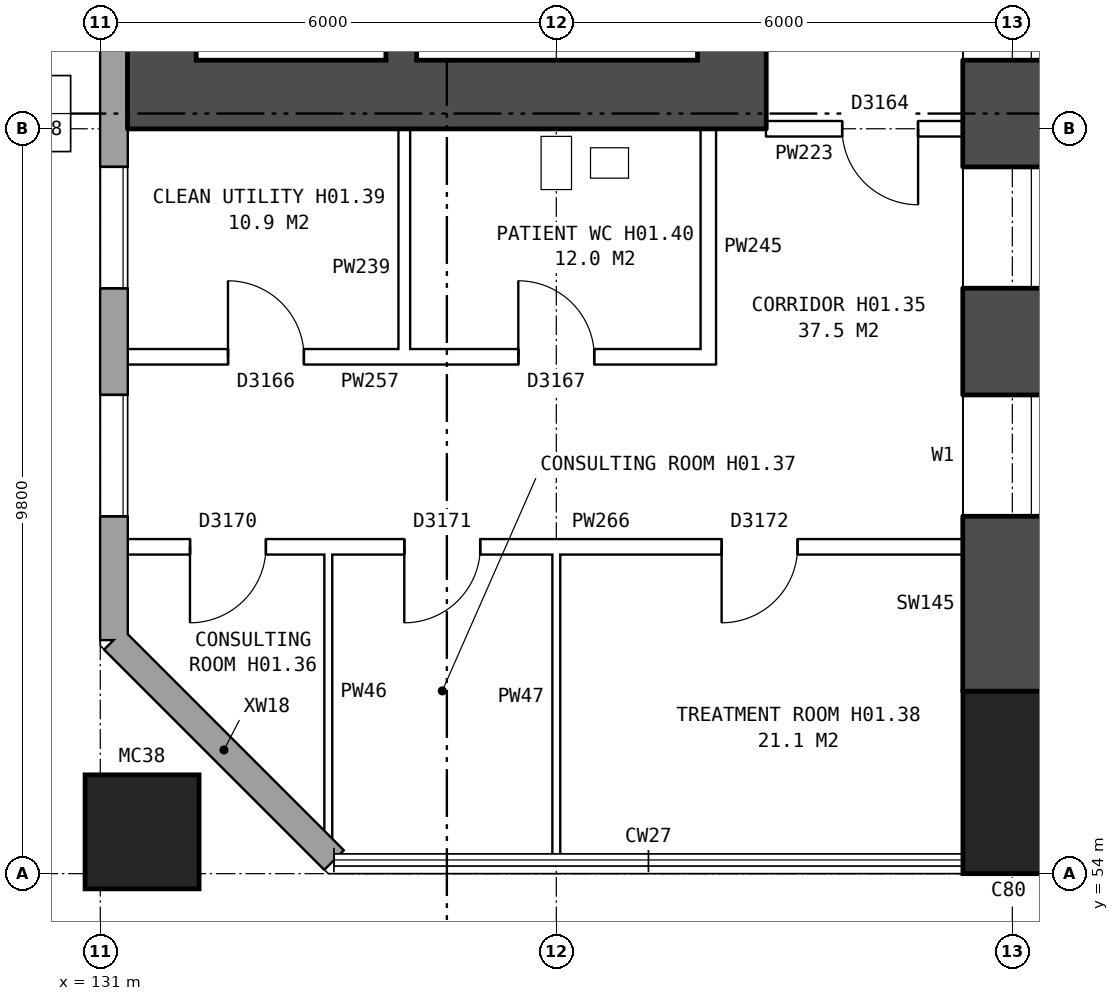
"""IFC4 building model, lengths in metres.
Left out: names, types, materials, properties, quantities, classifications, styles, units other than length and angle.
Written with IfcOpenShell. Run it as: python <this file> out.ifc"""

import sys

from ifc_helpers import new_model, si_unit, direction, frame, frame_2d, origin, origin_2d, place, context, subcontext, project, spatial, rectangle, hollow_rectangle, extrude, element, fill, save


model = new_model("IFC4")
c1 = context("Model", 3, precision=1e-05, world=origin(), true_north=direction((0.0, 1.0)))
c2 = subcontext(c1, "Body", "Model", "MODEL_VIEW")
j1 = project(units=[si_unit("LENGTHUNIT", "METRE"), si_unit("PLANEANGLEUNIT", "RADIAN")], contexts=[c1])
p1 = place(None, origin())
s1 = spatial("IfcSite", under=j1, at=p1, CompositionType="ELEMENT")
p2 = place(p1, origin())
s2 = spatial("IfcBuilding", under=s1, at=p2, CompositionType="ELEMENT")
p3 = place(p2, frame((0.0, 0.0, 5.5)))
s3 = spatial("IfcBuildingStorey", under=s2, at=p3, CompositionType="ELEMENT", Elevation=5.5)
p4 = place(p3, frame((142.95, 55.2, -0.3), z_axis=(0.0, 0.0, 1.0), x_axis=(1.0, 0.0, 0.0)))
e1 = element("IfcColumn", 1, at=p4, inside=s3, PredefinedType="COLUMN", context=c2, shape_type="SweptSolid", body=[
    extrude(rectangle(XDim=1.2, YDim=2.4, at=origin_2d()), origin(), (0.0, 0.0, 1.0), 4.6),
])
p5 = place(p3, frame((142.95, 56.4, -0.3), z_axis=(0.0, 0.0, 1.0), x_axis=(0.0, 1.0, 0.0)))
e2 = element("IfcWall", 2, at=p5, inside=s3, PredefinedType="SHEAR", context=c2, shape_type="SweptSolid", body=[
    extrude(rectangle(XDim=27.2, YDim=1.2, at=frame_2d((13.6, 0.0))), origin(), (0.0, 0.0, 1.0), 4.6),
])
p6 = place(p5, frame((2.3, 0.0, 0.8)))
e3 = element("IfcOpeningElement", 3, at=p6, cuts=e2, PredefinedType="OPENING", context=c2, shape_type="SweptSolid", body=[
    extrude(rectangle(XDim=1.6, YDim=1.8, at=frame_2d((0.8, 0.9))), frame((0.0, 0.61, 0.0), z_axis=(0.0, -1.0, 0.0), x_axis=(1.0, 0.0, 0.0)), (0.0, 0.0, 1.0), 1.22),
])
p7 = place(p5, frame((5.3, 0.0, 0.8)))
e4 = element("IfcOpeningElement", 4, at=p7, cuts=e2, PredefinedType="OPENING", context=c2, shape_type="SweptSolid", body=[
    extrude(rectangle(XDim=1.6, YDim=1.8, at=frame_2d((0.8, 0.9))), frame((0.0, 0.61, 0.0), z_axis=(0.0, -1.0, 0.0), x_axis=(1.0, 0.0, 0.0)), (0.0, 0.0, 1.0), 1.22),
])
p8 = place(p5, frame((8.3, 0.0, 0.8)))
e5 = element("IfcOpeningElement", 5, at=p8, cuts=e2, PredefinedType="OPENING", context=c2, shape_type="SweptSolid", body=[
    extrude(rectangle(XDim=1.6, YDim=1.8, at=frame_2d((0.8, 0.9))), frame((0.0, 0.61, 0.0), z_axis=(0.0, -1.0, 0.0), x_axis=(1.0, 0.0, 0.0)), (0.0, 0.0, 1.0), 1.22),
])
p9 = place(p5, frame((11.3, 0.0, 0.8)))
e6 = element("IfcOpeningElement", 6, at=p9, cuts=e2, PredefinedType="OPENING", context=c2, shape_type="SweptSolid", body=[
    extrude(rectangle(XDim=1.6, YDim=1.8, at=frame_2d((0.8, 0.9))), frame((0.0, 0.61, 0.0), z_axis=(0.0, -1.0, 0.0), x_axis=(1.0, 0.0, 0.0)), (0.0, 0.0, 1.0), 1.22),
])
p10 = place(p5, frame((14.3, 0.0, 0.8)))
e7 = element("IfcOpeningElement", 7, at=p10, cuts=e2, PredefinedType="OPENING", context=c2, shape_type="SweptSolid", body=[
    extrude(rectangle(XDim=1.6, YDim=1.8, at=frame_2d((0.8, 0.9))), frame((0.0, 0.61, 0.0), z_axis=(0.0, -1.0, 0.0), x_axis=(1.0, 0.0, 0.0)), (0.0, 0.0, 1.0), 1.22),
])
p11 = place(p5, frame((17.3, 0.0, 0.8)))
e8 = element("IfcOpeningElement", 8, at=p11, cuts=e2, PredefinedType="OPENING", context=c2, shape_type="SweptSolid", body=[
    extrude(rectangle(XDim=1.6, YDim=1.8, at=frame_2d((0.8, 0.9))), frame((0.0, 0.61, 0.0), z_axis=(0.0, -1.0, 0.0), x_axis=(1.0, 0.0, 0.0)), (0.0, 0.0, 1.0), 1.22),
])
p12 = place(p5, frame((20.3, 0.0, 0.8)))
e9 = element("IfcOpeningElement", 9, at=p12, cuts=e2, PredefinedType="OPENING", context=c2, shape_type="SweptSolid", body=[
    extrude(rectangle(XDim=1.6, YDim=1.8, at=frame_2d((0.8, 0.9))), frame((0.0, 0.61, 0.0), z_axis=(0.0, -1.0, 0.0), x_axis=(1.0, 0.0, 0.0)), (0.0, 0.0, 1.0), 1.22),
])
p13 = place(p5, frame((23.3, 0.0, 0.8)))
e10 = element("IfcOpeningElement", 10, at=p13, cuts=e2, PredefinedType="OPENING", context=c2, shape_type="SweptSolid", body=[
    extrude(rectangle(XDim=1.6, YDim=1.8, at=frame_2d((0.8, 0.9))), frame((0.0, 0.61, 0.0), z_axis=(0.0, -1.0, 0.0), x_axis=(1.0, 0.0, 0.0)), (0.0, 0.0, 1.0), 1.22),
])
p14 = place(p3, frame((131.55, 54.55, 0.0), z_axis=(0.0, 0.0, 1.0), x_axis=(1.0, 0.0, 0.0)))
e11 = element("IfcColumn", 11, at=p14, inside=s3, PredefinedType="COLUMN", context=c2, shape_type="SweptSolid", body=[
    extrude(hollow_rectangle(XDim=1.5, YDim=1.5, WallThickness=0.08, at=origin_2d()), origin(), (0.0, 0.0, 1.0), 4.6),
])
p15 = place(p3, frame((131.18, 57.075, 0.0), z_axis=(0.0, 0.0, 1.0), x_axis=(0.707106781187, -0.707106781187, 0.0)))
e12 = element("IfcWall", 12, at=p15, inside=s3, PredefinedType="STANDARD", context=c2, shape_type="SweptSolid", body=[
    extrude(rectangle(XDim=4.094, YDim=0.36, at=frame_2d((2.047, 0.0))), origin(), (0.0, 0.0, 1.0), 4.3),
])
p16 = place(p3, frame((131.18, 82.925, 0.0), z_axis=(0.0, 0.0, 1.0), x_axis=(0.0, -1.0, 0.0)))
e13 = element("IfcWall", 13, at=p16, inside=s3, PredefinedType="STANDARD", context=c2, shape_type="SweptSolid", body=[
    extrude(rectangle(XDim=25.851, YDim=0.36, at=frame_2d((12.925, 0.0))), origin(), (0.0, 0.0, 1.0), 4.3),
])
p17 = place(p16, frame((1.625, 0.0, 0.8)))
e14 = element("IfcOpeningElement", 14, at=p17, cuts=e13, PredefinedType="OPENING", context=c2, shape_type="SweptSolid", body=[
    extrude(rectangle(XDim=1.6, YDim=1.8, at=frame_2d((0.8, 0.9))), frame((0.0, 0.19, 0.0), z_axis=(0.0, -1.0, 0.0), x_axis=(1.0, 0.0, 0.0)), (0.0, 0.0, 1.0), 0.38),
])
p18 = place(p16, frame((4.625, 0.0, 0.8)))
e15 = element("IfcOpeningElement", 15, at=p18, cuts=e13, PredefinedType="OPENING", context=c2, shape_type="SweptSolid", body=[
    extrude(rectangle(XDim=1.6, YDim=1.8, at=frame_2d((0.8, 0.9))), frame((0.0, 0.19, 0.0), z_axis=(0.0, -1.0, 0.0), x_axis=(1.0, 0.0, 0.0)), (0.0, 0.0, 1.0), 0.38),
])
p19 = place(p16, frame((19.625, 0.0, 0.8)))
e16 = element("IfcOpeningElement", 16, at=p19, cuts=e13, PredefinedType="OPENING", context=c2, shape_type="SweptSolid", body=[
    extrude(rectangle(XDim=1.6, YDim=1.8, at=frame_2d((0.8, 0.9))), frame((0.0, 0.19, 0.0), z_axis=(0.0, -1.0, 0.0), x_axis=(1.0, 0.0, 0.0)), (0.0, 0.0, 1.0), 0.38),
])
p20 = place(p16, frame((22.625, 0.0, 0.8)))
e17 = element("IfcOpeningElement", 17, at=p20, cuts=e13, PredefinedType="OPENING", context=c2, shape_type="SweptSolid", body=[
    extrude(rectangle(XDim=1.6, YDim=1.8, at=frame_2d((0.8, 0.9))), frame((0.0, 0.19, 0.0), z_axis=(0.0, -1.0, 0.0), x_axis=(1.0, 0.0, 0.0)), (0.0, 0.0, 1.0), 0.38),
])
p21 = place(p3, frame((139.31, 64.7, 0.0), z_axis=(0.0, 0.0, 1.0), x_axis=(0.0, 1.0, 0.0)))
e18 = element("IfcWall", 18, at=p21, inside=s3, PredefinedType="SHEAR", context=c2, shape_type="SweptSolid", body=[
    extrude(rectangle(XDim=10.6, YDim=0.9, at=frame_2d((5.3, 0.0))), origin(), (0.0, 0.0, 1.0), 4.3),
])
p22 = place(p21, frame((0.425, 0.0, 0.0)))
e19 = element("IfcOpeningElement", 19, at=p22, cuts=e18, PredefinedType="OPENING", context=c2, shape_type="SweptSolid", body=[
    extrude(rectangle(XDim=1.1, YDim=2.1, at=frame_2d((0.55, 1.05))), frame((0.0, 0.46, 0.0), z_axis=(0.0, -1.0, 0.0), x_axis=(1.0, 0.0, 0.0)), (0.0, 0.0, 1.0), 0.92),
])
p23 = place(p21, frame((9.0, 0.0, 0.0)))
e20 = element("IfcOpeningElement", 20, at=p23, cuts=e18, PredefinedType="OPENING", context=c2, shape_type="SweptSolid", body=[
    extrude(rectangle(XDim=1.1, YDim=2.1, at=frame_2d((0.55, 1.05))), frame((0.0, 0.46, 0.0), z_axis=(0.0, -1.0, 0.0), x_axis=(1.0, 0.0, 0.0)), (0.0, 0.0, 1.0), 0.92),
])
p24 = place(p21, frame((7.225, 0.0, 0.0)))
e21 = element("IfcOpeningElement", 21, at=p24, cuts=e18, PredefinedType="OPENING", context=c2, shape_type="SweptSolid", body=[
    extrude(rectangle(XDim=0.85, YDim=2.1, at=frame_2d((0.425, 1.05))), frame((0.0, 0.46, 0.0), z_axis=(0.0, -1.0, 0.0), x_axis=(1.0, 0.0, 0.0)), (0.0, 0.0, 1.0), 0.92),
])
p25 = place(p3, frame((131.81, 64.7, 0.0), z_axis=(0.0, 0.0, 1.0), x_axis=(0.0, 1.0, 0.0)))
e22 = element("IfcWall", 22, at=p25, inside=s3, PredefinedType="SHEAR", context=c2, shape_type="SweptSolid", body=[
    extrude(rectangle(XDim=10.6, YDim=0.9, at=frame_2d((5.3, 0.0))), origin(), (0.0, 0.0, 1.0), 4.3),
])
p26 = place(p3, frame((139.76, 64.25, 0.0), z_axis=(0.0, 0.0, 1.0), x_axis=(-1.0, 0.0, 0.0)))
e23 = element("IfcWall", 23, at=p26, inside=s3, PredefinedType="SHEAR", context=c2, shape_type="SweptSolid", body=[
    extrude(rectangle(XDim=8.4, YDim=0.9, at=frame_2d((4.2, 0.0))), origin(), (0.0, 0.0, 1.0), 4.3),
])
p27 = place(p3, frame((134.96, 64.7, 0.0), z_axis=(0.0, 0.0, 1.0), x_axis=(0.0, 1.0, 0.0)))
e24 = element("IfcWall", 24, at=p27, inside=s3, PredefinedType="SHEAR", context=c2, shape_type="SweptSolid", body=[
    extrude(rectangle(XDim=6.35, YDim=0.4, at=frame_2d((3.175, 0.0))), origin(), (0.0, 0.0, 1.0), 4.3),
])
p28 = place(p3, frame((131.24, 58.3, 0.0), z_axis=(0.0, 0.0, 1.0), x_axis=(1.0, 0.0, 0.0)))
e25 = element("IfcWall", 25, at=p28, inside=s3, PredefinedType="PARTITIONING", context=c2, shape_type="SweptSolid", body=[
    extrude(rectangle(XDim=11.23, YDim=0.2, at=frame_2d((5.615, 0.0))), origin(), (0.0, 0.0, 1.0), 4.3),
])
p29 = place(p28, frame((0.94, 0.0, 0.0)))
e26 = element("IfcOpeningElement", 26, at=p29, cuts=e25, PredefinedType="OPENING", context=c2, shape_type="SweptSolid", body=[
    extrude(rectangle(XDim=1.0, YDim=2.1, at=frame_2d((0.5, 1.05))), frame((0.0, 0.11, 0.0), z_axis=(0.0, -1.0, 0.0), x_axis=(1.0, 0.0, 0.0)), (0.0, 0.0, 1.0), 0.22),
])
p30 = place(p28, frame((3.76, 0.0, 0.0)))
e27 = element("IfcOpeningElement", 27, at=p30, cuts=e25, PredefinedType="OPENING", context=c2, shape_type="SweptSolid", body=[
    extrude(rectangle(XDim=1.0, YDim=2.1, at=frame_2d((0.5, 1.05))), frame((0.0, 0.11, 0.0), z_axis=(0.0, -1.0, 0.0), x_axis=(1.0, 0.0, 0.0)), (0.0, 0.0, 1.0), 0.22),
])
p31 = place(p28, frame((7.935, 0.0, 0.0)))
e28 = element("IfcOpeningElement", 28, at=p31, cuts=e25, PredefinedType="OPENING", context=c2, shape_type="SweptSolid", body=[
    extrude(rectangle(XDim=1.0, YDim=2.1, at=frame_2d((0.5, 1.05))), frame((0.0, 0.11, 0.0), z_axis=(0.0, -1.0, 0.0), x_axis=(1.0, 0.0, 0.0)), (0.0, 0.0, 1.0), 0.22),
])
p32 = place(p3, frame((131.24, 60.8, 0.0), z_axis=(0.0, 0.0, 1.0), x_axis=(1.0, 0.0, 0.0)))
e29 = element("IfcWall", 29, at=p32, inside=s3, PredefinedType="PARTITIONING", context=c2, shape_type="SweptSolid", body=[
    extrude(rectangle(XDim=7.86, YDim=0.2, at=frame_2d((3.93, 0.0))), origin(), (0.0, 0.0, 1.0), 4.3),
])
p33 = place(p32, frame((1.44, 0.0, 0.0)))
e30 = element("IfcOpeningElement", 30, at=p33, cuts=e29, PredefinedType="OPENING", context=c2, shape_type="SweptSolid", body=[
    extrude(rectangle(XDim=1.0, YDim=2.1, at=frame_2d((0.5, 1.05))), frame((0.0, 0.11, 0.0), z_axis=(0.0, -1.0, 0.0), x_axis=(1.0, 0.0, 0.0)), (0.0, 0.0, 1.0), 0.22),
])
p34 = place(p32, frame((5.26, 0.0, 0.0)))
e31 = element("IfcOpeningElement", 31, at=p34, cuts=e29, PredefinedType="OPENING", context=c2, shape_type="SweptSolid", body=[
    extrude(rectangle(XDim=1.0, YDim=2.1, at=frame_2d((0.5, 1.05))), frame((0.0, 0.11, 0.0), z_axis=(0.0, -1.0, 0.0), x_axis=(1.0, 0.0, 0.0)), (0.0, 0.0, 1.0), 0.22),
])
p35 = place(p3, frame((139.76, 63.8, 0.0), z_axis=(0.0, 0.0, 1.0), x_axis=(1.0, 0.0, 0.0)))
e32 = element("IfcWall", 32, at=p35, inside=s3, PredefinedType="PARTITIONING", context=c2, shape_type="SweptSolid", body=[
    extrude(rectangle(XDim=2.59, YDim=0.2, at=frame_2d((1.295, 0.0))), origin(), (0.0, 0.0, 1.0), 4.3),
])
p36 = place(p35, frame((1.0, 0.0, 0.0)))
e33 = element("IfcOpeningElement", 33, at=p36, cuts=e32, PredefinedType="OPENING", context=c2, shape_type="SweptSolid", body=[
    extrude(rectangle(XDim=1.0, YDim=2.1, at=frame_2d((0.5, 1.05))), frame((0.0, 0.11, 0.0), z_axis=(0.0, -1.0, 0.0), x_axis=(1.0, 0.0, 0.0)), (0.0, 0.0, 1.0), 0.22),
])
p37 = place(p3, frame((134.0, 54.389, 0.0), z_axis=(0.0, 0.0, 1.0), x_axis=(0.0, 1.0, 0.0)))
e34 = element("IfcWall", 34, at=p37, inside=s3, PredefinedType="PARTITIONING", context=c2, shape_type="SweptSolid", body=[
    extrude(rectangle(XDim=4.011, YDim=0.1, at=frame_2d((2.005, 0.0))), origin(), (0.0, 0.0, 1.0), 4.3),
])
p38 = place(p3, frame((135.0, 60.7, 0.0), z_axis=(0.0, 0.0, 1.0), x_axis=(0.0, 1.0, 0.0)))
e35 = element("IfcWall", 35, at=p38, inside=s3, PredefinedType="PLUMBINGWALL", context=c2, shape_type="SweptSolid", body=[
    extrude(rectangle(XDim=3.1, YDim=0.15, at=frame_2d((1.55, 0.0))), origin(), (0.0, 0.0, 1.0), 4.3),
])
p39 = place(p3, frame((137.0, 54.24, 0.0), z_axis=(0.0, 0.0, 1.0), x_axis=(0.0, 1.0, 0.0)))
e36 = element("IfcWall", 36, at=p39, inside=s3, PredefinedType="PARTITIONING", context=c2, shape_type="SweptSolid", body=[
    extrude(rectangle(XDim=4.16, YDim=0.1, at=frame_2d((2.08, 0.0))), origin(), (0.0, 0.0, 1.0), 4.3),
])
p40 = place(p3, frame((139.0, 60.7, 0.0), z_axis=(0.0, 0.0, 1.0), x_axis=(0.0, 1.0, 0.0)))
e37 = element("IfcWall", 37, at=p40, inside=s3, PredefinedType="PARTITIONING", context=c2, shape_type="SweptSolid", body=[
    extrude(rectangle(XDim=3.1, YDim=0.2, at=frame_2d((1.55, 0.0))), origin(), (0.0, 0.0, 1.0), 4.3),
])
p41 = place(p19, origin())
e38 = element("IfcWindow", 38, at=p41, inside=s3, PartitioningType="SINGLE_PANEL", PredefinedType="WINDOW", context=c2, shape_type="SweptSolid", body=[
    extrude(rectangle(XDim=1.6, YDim=1.8, at=frame_2d((0.8, 0.9))), frame((0.0, 0.15, 0.0), z_axis=(0.0, -1.0, 0.0), x_axis=(1.0, 0.0, 0.0)), (0.0, 0.0, 1.0), 0.06),
])
fill(e16, e38)
p42 = place(p20, origin())
e39 = element("IfcWindow", 39, at=p42, inside=s3, PartitioningType="SINGLE_PANEL", PredefinedType="WINDOW", context=c2, shape_type="SweptSolid", body=[
    extrude(rectangle(XDim=1.6, YDim=1.8, at=frame_2d((0.8, 0.9))), frame((0.0, 0.15, 0.0), z_axis=(0.0, -1.0, 0.0), x_axis=(1.0, 0.0, 0.0)), (0.0, 0.0, 1.0), 0.06),
])
fill(e17, e39)
p43 = place(p6, origin())
e40 = element("IfcWindow", 40, at=p43, inside=s3, PartitioningType="SINGLE_PANEL", PredefinedType="WINDOW", context=c2, shape_type="SweptSolid", body=[
    extrude(rectangle(XDim=1.6, YDim=1.8, at=frame_2d((0.8, 0.9))), frame((0.0, -0.27, 0.0), z_axis=(0.0, -1.0, 0.0), x_axis=(1.0, 0.0, 0.0)), (0.0, 0.0, 1.0), 0.06),
])
fill(e3, e40)
p44 = place(p7, origin())
e41 = element("IfcWindow", 41, at=p44, inside=s3, PartitioningType="SINGLE_PANEL", PredefinedType="WINDOW", context=c2, shape_type="SweptSolid", body=[
    extrude(rectangle(XDim=1.6, YDim=1.8, at=frame_2d((0.8, 0.9))), frame((0.0, -0.27, 0.0), z_axis=(0.0, -1.0, 0.0), x_axis=(1.0, 0.0, 0.0)), (0.0, 0.0, 1.0), 0.06),
])
fill(e4, e41)
p45 = place(p8, origin())
e42 = element("IfcWindow", 42, at=p45, inside=s3, PartitioningType="SINGLE_PANEL", PredefinedType="WINDOW", context=c2, shape_type="SweptSolid", body=[
    extrude(rectangle(XDim=1.6, YDim=1.8, at=frame_2d((0.8, 0.9))), frame((0.0, -0.27, 0.0), z_axis=(0.0, -1.0, 0.0), x_axis=(1.0, 0.0, 0.0)), (0.0, 0.0, 1.0), 0.06),
])
fill(e5, e42)
p46 = place(p29, frame((1.0, 0.0, 0.0), z_axis=(0.0, 0.0, 1.0), x_axis=(-1.0, 0.0, 0.0)))
e43 = element("IfcDoor", 43, at=p46, inside=s3, OperationType="SINGLE_SWING_RIGHT", PredefinedType="DOOR", context=c2, shape_type="SweptSolid", body=[
    extrude(rectangle(XDim=1.0, YDim=2.1, at=frame_2d((0.5, 1.05))), frame((0.0, 0.025, 0.0), z_axis=(0.0, -1.0, 0.0), x_axis=(1.0, 0.0, 0.0)), (0.0, 0.0, 1.0), 0.05),
])
fill(e26, e43)
p47 = place(p30, frame((1.0, 0.0, 0.0), z_axis=(0.0, 0.0, 1.0), x_axis=(-1.0, 0.0, 0.0)))
e44 = element("IfcDoor", 44, at=p47, inside=s3, OperationType="SINGLE_SWING_RIGHT", PredefinedType="DOOR", context=c2, shape_type="SweptSolid", body=[
    extrude(rectangle(XDim=1.0, YDim=2.1, at=frame_2d((0.5, 1.05))), frame((0.0, 0.025, 0.0), z_axis=(0.0, -1.0, 0.0), x_axis=(1.0, 0.0, 0.0)), (0.0, 0.0, 1.0), 0.05),
])
fill(e27, e44)
p48 = place(p31, frame((1.0, 0.0, 0.0), z_axis=(0.0, 0.0, 1.0), x_axis=(-1.0, 0.0, 0.0)))
e45 = element("IfcDoor", 45, at=p48, inside=s3, OperationType="SINGLE_SWING_RIGHT", PredefinedType="DOOR", context=c2, shape_type="SweptSolid", body=[
    extrude(rectangle(XDim=1.0, YDim=2.1, at=frame_2d((0.5, 1.05))), frame((0.0, 0.025, 0.0), z_axis=(0.0, -1.0, 0.0), x_axis=(1.0, 0.0, 0.0)), (0.0, 0.0, 1.0), 0.05),
])
fill(e28, e45)
p49 = place(p33, origin())
e46 = element("IfcDoor", 46, at=p49, inside=s3, OperationType="SINGLE_SWING_LEFT", PredefinedType="DOOR", context=c2, shape_type="SweptSolid", body=[
    extrude(rectangle(XDim=1.0, YDim=2.1, at=frame_2d((0.5, 1.05))), frame((0.0, 0.025, 0.0), z_axis=(0.0, -1.0, 0.0), x_axis=(1.0, 0.0, 0.0)), (0.0, 0.0, 1.0), 0.05),
])
fill(e30, e46)
p50 = place(p34, origin())
e47 = element("IfcDoor", 47, at=p50, inside=s3, OperationType="SINGLE_SWING_LEFT", PredefinedType="DOOR", context=c2, shape_type="SweptSolid", body=[
    extrude(rectangle(XDim=1.0, YDim=2.1, at=frame_2d((0.5, 1.05))), frame((0.0, 0.025, 0.0), z_axis=(0.0, -1.0, 0.0), x_axis=(1.0, 0.0, 0.0)), (0.0, 0.0, 1.0), 0.05),
])
fill(e31, e47)
p51 = place(p36, frame((1.0, 0.0, 0.0), z_axis=(0.0, 0.0, 1.0), x_axis=(-1.0, 0.0, 0.0)))
e48 = element("IfcDoor", 48, at=p51, inside=s3, OperationType="SINGLE_SWING_LEFT", PredefinedType="DOOR", context=c2, shape_type="SweptSolid", body=[
    extrude(rectangle(XDim=1.0, YDim=2.1, at=frame_2d((0.5, 1.05))), frame((0.0, 0.025, 0.0), z_axis=(0.0, -1.0, 0.0), x_axis=(1.0, 0.0, 0.0)), (0.0, 0.0, 1.0), 0.05),
])
fill(e33, e48)
save(model, sys.argv[1])
